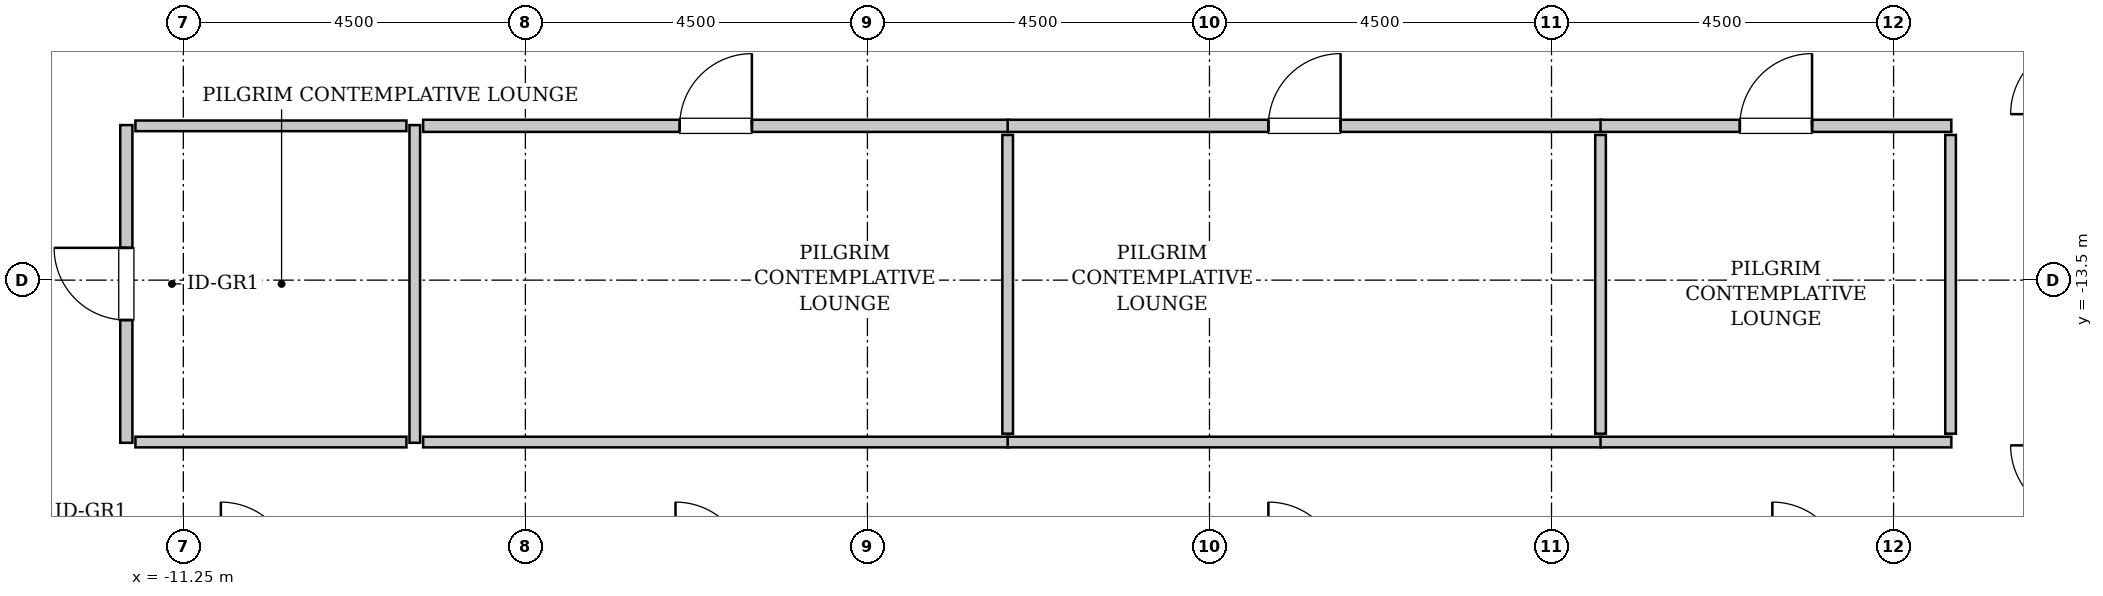
"""IFC4 building model, lengths in metres.
Left out: names, types, materials, properties, quantities, classifications, styles, units other than length and angle.
Written with IfcOpenShell. Run it as: python <this file> out.ifc"""

import sys

from ifc_helpers import new_model, si_unit, direction, frame, frame_2d, origin, place, context, subcontext, project, spatial, rectangle, extrude, source, transform, mapped, element, fill, save


model = new_model("IFC4")
c1 = context("Model", 3, precision=1e-05, world=origin(), true_north=direction((0.0, 1.0)))
c2 = subcontext(c1, "Body", "Model", "MODEL_VIEW")
j1 = project(units=[si_unit("LENGTHUNIT", "METRE"), si_unit("PLANEANGLEUNIT", "RADIAN")], contexts=[c1])
p1 = place(None, origin())
s1 = spatial("IfcSite", under=j1, at=p1, CompositionType="ELEMENT")
p2 = place(p1, origin())
s2 = spatial("IfcBuilding", under=s1, at=p2, CompositionType="ELEMENT")
p3 = place(p2, frame((0.0, 0.0, 206.6)))
s3 = spatial("IfcBuildingStorey", under=s2, at=p3, CompositionType="ELEMENT", Elevation=206.6)
m1 = source(origin(), c2, "Body", "SweptSolid", [
    extrude(rectangle(XDim=4.18, YDim=0.16, at=frame_2d((2.09, 0.0))), origin(), (0.0, 0.0, 1.0), 3.535),
])
p4 = place(p3, frame((-12.0, -15.64, 0.0), z_axis=(0.0, 0.0, 1.0), x_axis=(0.0, 1.0, 0.0)))
e1 = element("IfcWall", 1, at=p4, inside=s3, PredefinedType="PARTITIONING", context=c2, shape_type="MappedRepresentation", body=[
    mapped(m1, transform((0.0, 0.0, 0.0), x_axis=(1.0, 0.0, 0.0), y_axis=(0.0, 1.0, 0.0), z_axis=(0.0, 0.0, 1.0), scale=1.0)),
])
p5 = place(p4, frame((1.615, 0.0, 0.0)))
e2 = element("IfcOpeningElement", 2, at=p5, cuts=e1, PredefinedType="OPENING", context=c2, shape_type="SweptSolid", body=[
    extrude(rectangle(XDim=0.95, YDim=2.1, at=frame_2d((0.475, 1.05))), frame((0.0, 0.09, 0.0), z_axis=(0.0, -1.0, 0.0), x_axis=(1.0, 0.0, 0.0)), (0.0, 0.0, 1.0), 0.18),
])
m2 = source(origin(), c2, "Body", "SweptSolid", [
    extrude(rectangle(XDim=4.18, YDim=0.14, at=frame_2d((2.09, 0.0))), origin(), (0.0, 0.0, 1.0), 3.535),
])
p6 = place(p3, frame((-8.205, -15.64, 0.0), z_axis=(0.0, 0.0, 1.0), x_axis=(0.0, 1.0, 0.0)))
e3 = element("IfcWall", 3, at=p6, inside=s3, PredefinedType="PARTITIONING", context=c2, shape_type="MappedRepresentation", body=[
    mapped(m2, transform((0.0, 0.0, 0.0), x_axis=(1.0, 0.0, 0.0), y_axis=(0.0, 1.0, 0.0), z_axis=(0.0, 0.0, 1.0), scale=1.0)),
])
m3 = source(origin(), c2, "Body", "SweptSolid", [
    extrude(rectangle(XDim=3.565, YDim=0.14, at=frame_2d((1.782, 0.0))), origin(), (0.0, 0.0, 1.0), 3.535),
])
for number, where, z_axis, x_axis in (
    (4, (-11.88, -11.47, 0.0), (0.0, 0.0, 1.0), (1.0, 0.0, 0.0)),
    (5, (-11.88, -15.63, 0.0), (0.0, 0.0, 1.0), (1.0, 0.0, 0.0)),
):
    element("IfcWall", number, at=place(p3, frame(where, z_axis=z_axis, x_axis=x_axis)), inside=s3, PredefinedType="PARTITIONING", context=c2, shape_type="MappedRepresentation", body=[
        mapped(m3, transform((0.0, 0.0, 0.0), x_axis=(1.0, 0.0, 0.0), y_axis=(0.0, 1.0, 0.0), z_axis=(0.0, 0.0, 1.0), scale=1.0)),
    ])
m4 = source(origin(), c2, "Body", "SweptSolid", [
    extrude(rectangle(XDim=7.7, YDim=0.16, at=frame_2d((3.85, 0.0))), origin(), (0.0, 0.0, 1.0), 3.535),
])
p7 = place(p3, frame((-8.095, -11.47, 0.0), z_axis=(0.0, 0.0, 1.0), x_axis=(1.0, 0.0, 0.0)))
e6 = element("IfcWall", 6, at=p7, inside=s3, PredefinedType="PARTITIONING", context=c2, shape_type="MappedRepresentation", body=[
    mapped(m4, transform((0.0, 0.0, 0.0), x_axis=(1.0, 0.0, 0.0), y_axis=(0.0, 1.0, 0.0), z_axis=(0.0, 0.0, 1.0), scale=1.0)),
])
p8 = place(p7, frame((3.375, 0.0, 0.0)))
e7 = element("IfcOpeningElement", 7, at=p8, cuts=e6, PredefinedType="OPENING", context=c2, shape_type="SweptSolid", body=[
    extrude(rectangle(XDim=0.95, YDim=2.1, at=frame_2d((0.475, 1.05))), frame((0.0, 0.09, 0.0), z_axis=(0.0, -1.0, 0.0), x_axis=(1.0, 0.0, 0.0)), (0.0, 0.0, 1.0), 0.18),
])
m5 = source(origin(), c2, "Body", "SweptSolid", [
    extrude(rectangle(XDim=7.7, YDim=0.14, at=frame_2d((3.85, 0.0))), origin(), (0.0, 0.0, 1.0), 3.535),
])
p9 = place(p3, frame((-8.095, -15.63, 0.0), z_axis=(0.0, 0.0, 1.0), x_axis=(1.0, 0.0, 0.0)))
e8 = element("IfcWall", 8, at=p9, inside=s3, PredefinedType="PARTITIONING", context=c2, shape_type="MappedRepresentation", body=[
    mapped(m5, transform((0.0, 0.0, 0.0), x_axis=(1.0, 0.0, 0.0), y_axis=(0.0, 1.0, 0.0), z_axis=(0.0, 0.0, 1.0), scale=1.0)),
])
m6 = source(origin(), c2, "Body", "SweptSolid", [
    extrude(rectangle(XDim=3.93, YDim=0.14, at=frame_2d((1.965, 0.0))), origin(), (0.0, 0.0, 1.0), 3.535),
])
p10 = place(p3, frame((-0.405, -15.52, 0.0), z_axis=(0.0, 0.0, 1.0), x_axis=(0.0, 1.0, 0.0)))
e9 = element("IfcWall", 9, at=p10, inside=s3, PredefinedType="PARTITIONING", context=c2, shape_type="MappedRepresentation", body=[
    mapped(m6, transform((0.0, 0.0, 0.0), x_axis=(1.0, 0.0, 0.0), y_axis=(0.0, 1.0, 0.0), z_axis=(0.0, 0.0, 1.0), scale=1.0)),
])
m7 = source(origin(), c2, "Body", "SweptSolid", [
    extrude(rectangle(XDim=7.81, YDim=0.16, at=frame_2d((3.905, 0.0))), origin(), (0.0, 0.0, 1.0), 3.535),
])
p11 = place(p3, frame((-0.405, -11.47, 0.0), z_axis=(0.0, 0.0, 1.0), x_axis=(1.0, 0.0, 0.0)))
e10 = element("IfcWall", 10, at=p11, inside=s3, PredefinedType="PARTITIONING", context=c2, shape_type="MappedRepresentation", body=[
    mapped(m7, transform((0.0, 0.0, 0.0), x_axis=(1.0, 0.0, 0.0), y_axis=(0.0, 1.0, 0.0), z_axis=(0.0, 0.0, 1.0), scale=1.0)),
])
p12 = place(p11, frame((3.43, 0.0, 0.0)))
e11 = element("IfcOpeningElement", 11, at=p12, cuts=e10, PredefinedType="OPENING", context=c2, shape_type="SweptSolid", body=[
    extrude(rectangle(XDim=0.95, YDim=2.1, at=frame_2d((0.475, 1.05))), frame((0.0, 0.09, 0.0), z_axis=(0.0, -1.0, 0.0), x_axis=(1.0, 0.0, 0.0)), (0.0, 0.0, 1.0), 0.18),
])
m8 = source(origin(), c2, "Body", "SweptSolid", [
    extrude(rectangle(XDim=7.81, YDim=0.14, at=frame_2d((3.905, 0.0))), origin(), (0.0, 0.0, 1.0), 3.535),
])
p13 = place(p3, frame((-0.405, -15.63, 0.0), z_axis=(0.0, 0.0, 1.0), x_axis=(1.0, 0.0, 0.0)))
e12 = element("IfcWall", 12, at=p13, inside=s3, PredefinedType="PARTITIONING", context=c2, shape_type="MappedRepresentation", body=[
    mapped(m8, transform((0.0, 0.0, 0.0), x_axis=(1.0, 0.0, 0.0), y_axis=(0.0, 1.0, 0.0), z_axis=(0.0, 0.0, 1.0), scale=1.0)),
])
p14 = place(p3, frame((7.395, -15.52, 0.0), z_axis=(0.0, 0.0, 1.0), x_axis=(0.0, 1.0, 0.0)))
e13 = element("IfcWall", 13, at=p14, inside=s3, PredefinedType="PARTITIONING", context=c2, shape_type="MappedRepresentation", body=[
    mapped(m6, transform((0.0, 0.0, 0.0), x_axis=(1.0, 0.0, 0.0), y_axis=(0.0, 1.0, 0.0), z_axis=(0.0, 0.0, 1.0), scale=1.0)),
])
m9 = source(origin(), c2, "Body", "SweptSolid", [
    extrude(rectangle(XDim=4.615, YDim=0.16, at=frame_2d((2.308, 0.0))), origin(), (0.0, 0.0, 1.0), 3.535),
])
p15 = place(p3, frame((7.395, -11.47, 0.0), z_axis=(0.0, 0.0, 1.0), x_axis=(1.0, 0.0, 0.0)))
e14 = element("IfcWall", 14, at=p15, inside=s3, PredefinedType="PARTITIONING", context=c2, shape_type="MappedRepresentation", body=[
    mapped(m9, transform((0.0, 0.0, 0.0), x_axis=(1.0, 0.0, 0.0), y_axis=(0.0, 1.0, 0.0), z_axis=(0.0, 0.0, 1.0), scale=1.0)),
])
p16 = place(p15, frame((1.833, 0.0, 0.0)))
e15 = element("IfcOpeningElement", 15, at=p16, cuts=e14, PredefinedType="OPENING", context=c2, shape_type="SweptSolid", body=[
    extrude(rectangle(XDim=0.95, YDim=2.1, at=frame_2d((0.475, 1.05))), frame((0.0, 0.09, 0.0), z_axis=(0.0, -1.0, 0.0), x_axis=(1.0, 0.0, 0.0)), (0.0, 0.0, 1.0), 0.18),
])
m10 = source(origin(), c2, "Body", "SweptSolid", [
    extrude(rectangle(XDim=4.615, YDim=0.14, at=frame_2d((2.308, 0.0))), origin(), (0.0, 0.0, 1.0), 3.535),
])
p17 = place(p3, frame((7.395, -15.63, 0.0), z_axis=(0.0, 0.0, 1.0), x_axis=(1.0, 0.0, 0.0)))
e16 = element("IfcWall", 16, at=p17, inside=s3, PredefinedType="PARTITIONING", context=c2, shape_type="MappedRepresentation", body=[
    mapped(m10, transform((0.0, 0.0, 0.0), x_axis=(1.0, 0.0, 0.0), y_axis=(0.0, 1.0, 0.0), z_axis=(0.0, 0.0, 1.0), scale=1.0)),
])
p18 = place(p3, frame((12.0, -15.52, 0.0), z_axis=(0.0, 0.0, 1.0), x_axis=(0.0, 1.0, 0.0)))
e17 = element("IfcWall", 17, at=p18, inside=s3, PredefinedType="PARTITIONING", context=c2, shape_type="MappedRepresentation", body=[
    mapped(m6, transform((0.0, 0.0, 0.0), x_axis=(1.0, 0.0, 0.0), y_axis=(0.0, 1.0, 0.0), z_axis=(0.0, 0.0, 1.0), scale=1.0)),
])
m11 = source(origin(), c2, "Body", "SweptSolid", [
    extrude(rectangle(XDim=0.95, YDim=2.1, at=frame_2d((0.475, 1.05))), frame((0.0, 0.025, 0.0), z_axis=(0.0, -1.0, 0.0), x_axis=(1.0, 0.0, 0.0)), (0.0, 0.0, 1.0), 0.05),
])
p19 = place(p5, origin())
e18 = element("IfcDoor", 18, at=p19, inside=s3, OperationType="SINGLE_SWING_RIGHT", PredefinedType="DOOR", context=c2, shape_type="MappedRepresentation", body=[
    mapped(m11, transform((0.0, 0.0, 0.0), x_axis=(1.0, 0.0, 0.0), y_axis=(0.0, 1.0, 0.0), z_axis=(0.0, 0.0, 1.0), scale=1.0)),
])
fill(e2, e18)
p20 = place(p8, origin())
e19 = element("IfcDoor", 19, at=p20, inside=s3, OperationType="SINGLE_SWING_RIGHT", PredefinedType="DOOR", context=c2, shape_type="MappedRepresentation", body=[
    mapped(m11, transform((0.0, 0.0, 0.0), x_axis=(1.0, 0.0, 0.0), y_axis=(0.0, 1.0, 0.0), z_axis=(0.0, 0.0, 1.0), scale=1.0)),
])
fill(e7, e19)
p21 = place(p12, origin())
e20 = element("IfcDoor", 20, at=p21, inside=s3, OperationType="SINGLE_SWING_RIGHT", PredefinedType="DOOR", context=c2, shape_type="MappedRepresentation", body=[
    mapped(m11, transform((0.0, 0.0, 0.0), x_axis=(1.0, 0.0, 0.0), y_axis=(0.0, 1.0, 0.0), z_axis=(0.0, 0.0, 1.0), scale=1.0)),
])
fill(e11, e20)
p22 = place(p16, origin())
e21 = element("IfcDoor", 21, at=p22, inside=s3, OperationType="SINGLE_SWING_RIGHT", PredefinedType="DOOR", context=c2, shape_type="MappedRepresentation", body=[
    mapped(m11, transform((0.0, 0.0, 0.0), x_axis=(1.0, 0.0, 0.0), y_axis=(0.0, 1.0, 0.0), z_axis=(0.0, 0.0, 1.0), scale=1.0)),
])
fill(e15, e21)
save(model, sys.argv[1])
